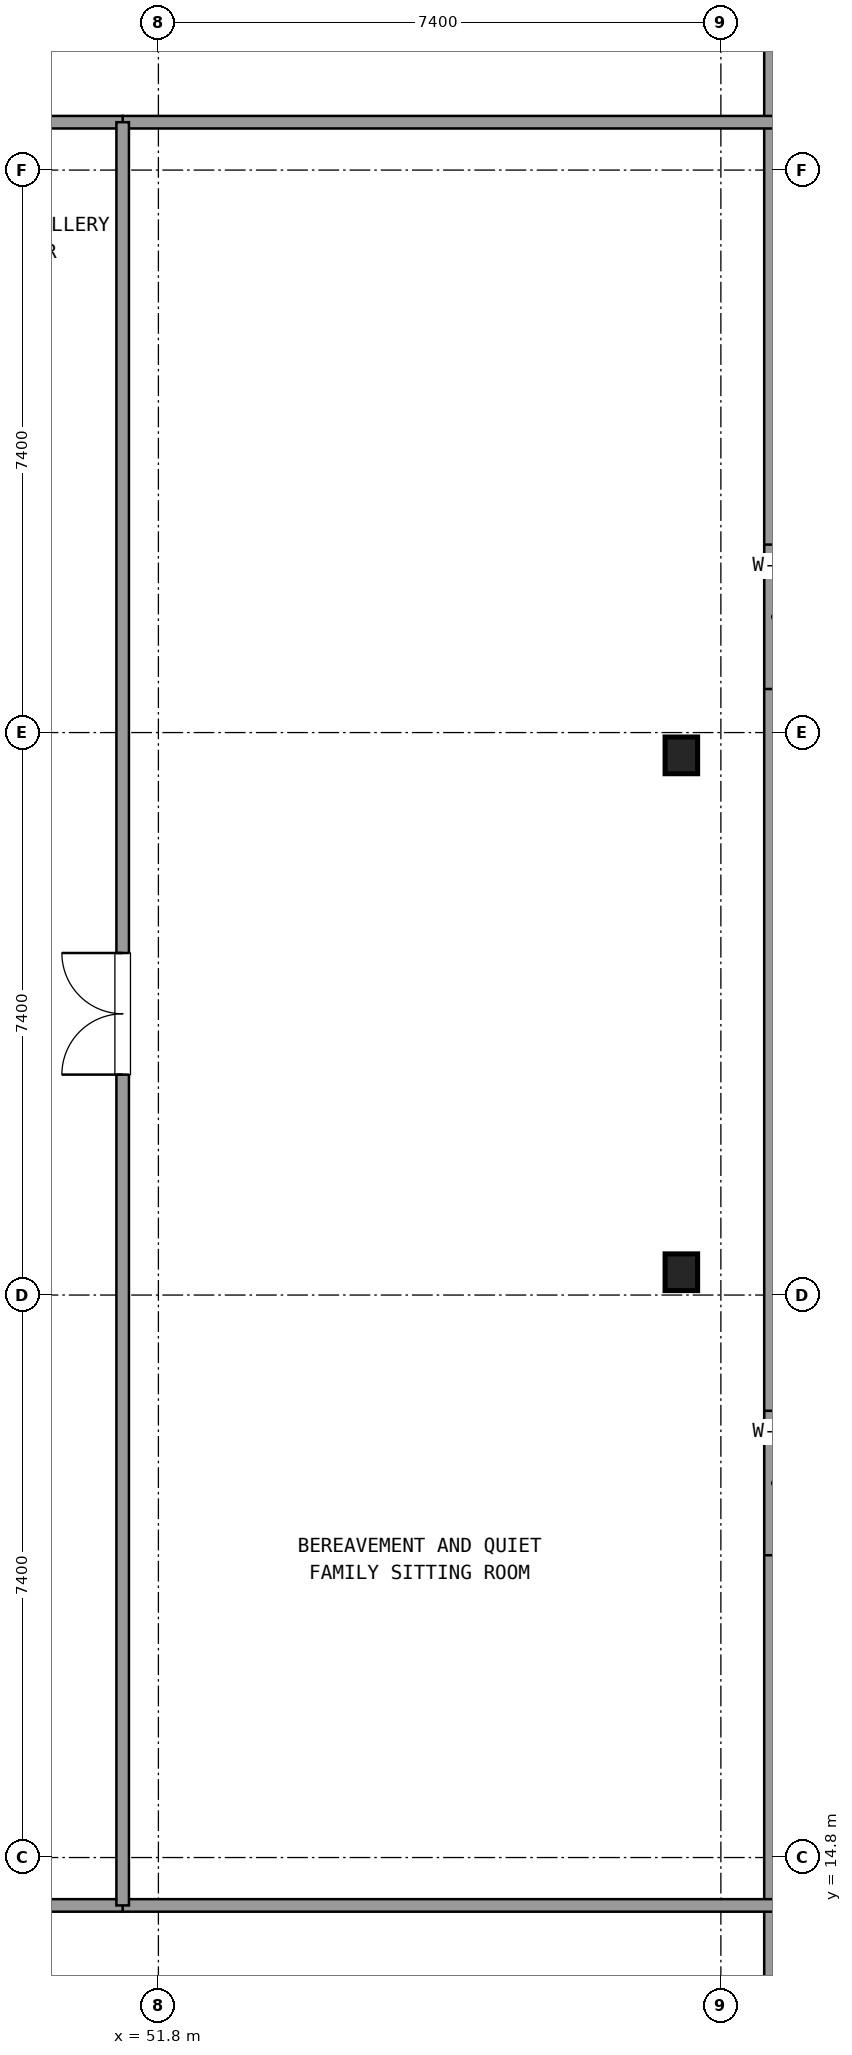
"""IFC4 building model, lengths in metres.
Left out: names, types, materials, properties, quantities, classifications, styles, units other than length and angle.
Written with IfcOpenShell. Run it as: python <this file> out.ifc"""

import sys

from ifc_helpers import new_model, si_unit, direction, frame, frame_2d, origin, origin_2d, place, context, subcontext, project, spatial, rectangle, i_section, extrude, element, fill, save


model = new_model("IFC4")
c1 = context("Model", 3, precision=1e-05, world=origin(), true_north=direction((0.0, 1.0)))
c2 = subcontext(c1, "Body", "Model", "MODEL_VIEW")
j1 = project(units=[si_unit("LENGTHUNIT", "METRE"), si_unit("PLANEANGLEUNIT", "RADIAN")], contexts=[c1])
p1 = place(None, origin())
s1 = spatial("IfcSite", under=j1, at=p1, CompositionType="ELEMENT")
p2 = place(p1, origin())
s2 = spatial("IfcBuilding", under=s1, at=p2, CompositionType="ELEMENT")
p3 = place(p2, frame((0.0, 0.0, 290.34)))
s3 = spatial("IfcBuildingStorey", under=s2, at=p3, CompositionType="ELEMENT", Elevation=290.34)
for number, where, z_axis, x_axis in (
    (1, (58.68, 22.5, 0.0), (0.0, 0.0, 1.0), (1.0, 0.0, 0.0)),
    (2, (58.68, 29.3, 0.0), (0.0, 0.0, 1.0), (1.0, 0.0, 0.0)),
):
    element("IfcColumn", number, at=place(p3, frame(where, z_axis=z_axis, x_axis=x_axis)), inside=s3, PredefinedType="COLUMN", context=c2, shape_type="SweptSolid", body=[
        extrude(i_section(OverallWidth=0.428, OverallDepth=0.483, WebThickness=0.042, FlangeThickness=0.068, at=origin_2d()), origin(), (0.0, 0.0, 1.0), 4.32),
    ])
p4 = place(p3, frame((59.92, 11.655, 0.0), z_axis=(0.0, 0.0, 1.0), x_axis=(0.0, 1.0, 0.0)))
e3 = element("IfcWall", 3, at=p4, inside=s3, PredefinedType="SOLIDWALL", context=c2, shape_type="SweptSolid", body=[
    extrude(rectangle(XDim=28.49, YDim=0.3, at=frame_2d((14.245, 0.0))), origin(), (0.0, 0.0, 1.0), 3.46),
])
p5 = place(p4, frame((7.122, 0.0, 0.85)))
e4 = element("IfcOpeningElement", 4, at=p5, cuts=e3, PredefinedType="OPENING", context=c2, shape_type="SweptSolid", body=[
    extrude(rectangle(XDim=1.9, YDim=1.7, at=frame_2d((0.95, 0.85))), frame((0.0, 0.16, 0.0), z_axis=(0.0, -1.0, 0.0), x_axis=(1.0, 0.0, 0.0)), (0.0, 0.0, 1.0), 0.32),
])
p6 = place(p4, frame((18.518, 0.0, 0.85)))
e5 = element("IfcOpeningElement", 5, at=p6, cuts=e3, PredefinedType="OPENING", context=c2, shape_type="SweptSolid", body=[
    extrude(rectangle(XDim=1.9, YDim=1.7, at=frame_2d((0.95, 0.85))), frame((0.0, 0.16, 0.0), z_axis=(0.0, -1.0, 0.0), x_axis=(1.0, 0.0, 0.0)), (0.0, 0.0, 1.0), 0.32),
])
for number, where, z_axis, x_axis in (
    (6, (51.33, 37.63, 0.0), (0.0, 0.0, 1.0), (1.0, 0.0, 0.0)),
    (7, (51.33, 14.17, 0.0), (0.0, 0.0, 1.0), (1.0, 0.0, 0.0)),
):
    element("IfcWall", number, at=place(p3, frame(where, z_axis=z_axis, x_axis=x_axis)), inside=s3, PredefinedType="PARTITIONING", context=c2, shape_type="SweptSolid", body=[
        extrude(rectangle(XDim=8.57, YDim=0.165, at=frame_2d((4.285, 0.0))), origin(), (0.0, 0.0, 1.0), 2.93),
    ])
p7 = place(p3, frame((42.251, 37.63, 0.0), z_axis=(0.0, 0.0, 1.0), x_axis=(1.0, 0.0, 0.0)))
e8 = element("IfcWall", 8, at=p7, inside=s3, PredefinedType="PARTITIONING", context=c2, shape_type="SweptSolid", body=[
    extrude(rectangle(XDim=9.079, YDim=0.165, at=frame_2d((4.54, 0.0))), origin(), (0.0, 0.0, 1.0), 2.93),
])
p8 = place(p7, frame((3.74, 0.0, 0.0)))
e9 = element("IfcOpeningElement", 9, at=p8, cuts=e8, PredefinedType="OPENING", context=c2, shape_type="SweptSolid", body=[
    extrude(rectangle(XDim=1.6, YDim=2.2, at=frame_2d((0.8, 1.1))), frame((0.0, 0.093, 0.0), z_axis=(0.0, -1.0, 0.0), x_axis=(1.0, 0.0, 0.0)), (0.0, 0.0, 1.0), 0.185),
])
p9 = place(p3, frame((46.627, 14.17, 0.0), z_axis=(0.0, 0.0, 1.0), x_axis=(1.0, 0.0, 0.0)))
e10 = element("IfcWall", 10, at=p9, inside=s3, PredefinedType="PARTITIONING", context=c2, shape_type="SweptSolid", body=[
    extrude(rectangle(XDim=4.703, YDim=0.165, at=frame_2d((2.352, 0.0))), origin(), (0.0, 0.0, 1.0), 2.93),
])
p10 = place(p9, frame((1.551, 0.0, 0.0)))
e11 = element("IfcOpeningElement", 11, at=p10, cuts=e10, PredefinedType="OPENING", context=c2, shape_type="SweptSolid", body=[
    extrude(rectangle(XDim=1.6, YDim=2.2, at=frame_2d((0.8, 1.1))), frame((0.0, 0.093, 0.0), z_axis=(0.0, -1.0, 0.0), x_axis=(1.0, 0.0, 0.0)), (0.0, 0.0, 1.0), 0.185),
])
p11 = place(p3, frame((51.33, 14.17, 0.0), z_axis=(0.0, 0.0, 1.0), x_axis=(0.0, 1.0, 0.0)))
e12 = element("IfcWall", 12, at=p11, inside=s3, PredefinedType="PARTITIONING", context=c2, shape_type="SweptSolid", body=[
    extrude(rectangle(XDim=23.46, YDim=0.165, at=frame_2d((11.73, 0.0))), origin(), (0.0, 0.0, 1.0), 2.93),
])
p12 = place(p11, frame((10.93, 0.0, 0.0)))
e13 = element("IfcOpeningElement", 13, at=p12, cuts=e12, PredefinedType="OPENING", context=c2, shape_type="SweptSolid", body=[
    extrude(rectangle(XDim=1.6, YDim=2.2, at=frame_2d((0.8, 1.1))), frame((0.0, 0.093, 0.0), z_axis=(0.0, -1.0, 0.0), x_axis=(1.0, 0.0, 0.0)), (0.0, 0.0, 1.0), 0.185),
])
p13 = place(p12, origin())
e14 = element("IfcDoor", 14, at=p13, inside=s3, OperationType="DOUBLE_DOOR_SINGLE_SWING", PredefinedType="DOOR", context=c2, shape_type="SweptSolid", body=[
    extrude(rectangle(XDim=1.6, YDim=2.2, at=frame_2d((0.8, 1.1))), frame((0.0, 0.025, 0.0), z_axis=(0.0, -1.0, 0.0), x_axis=(1.0, 0.0, 0.0)), (0.0, 0.0, 1.0), 0.05),
])
fill(e13, e14)
save(model, sys.argv[1])
